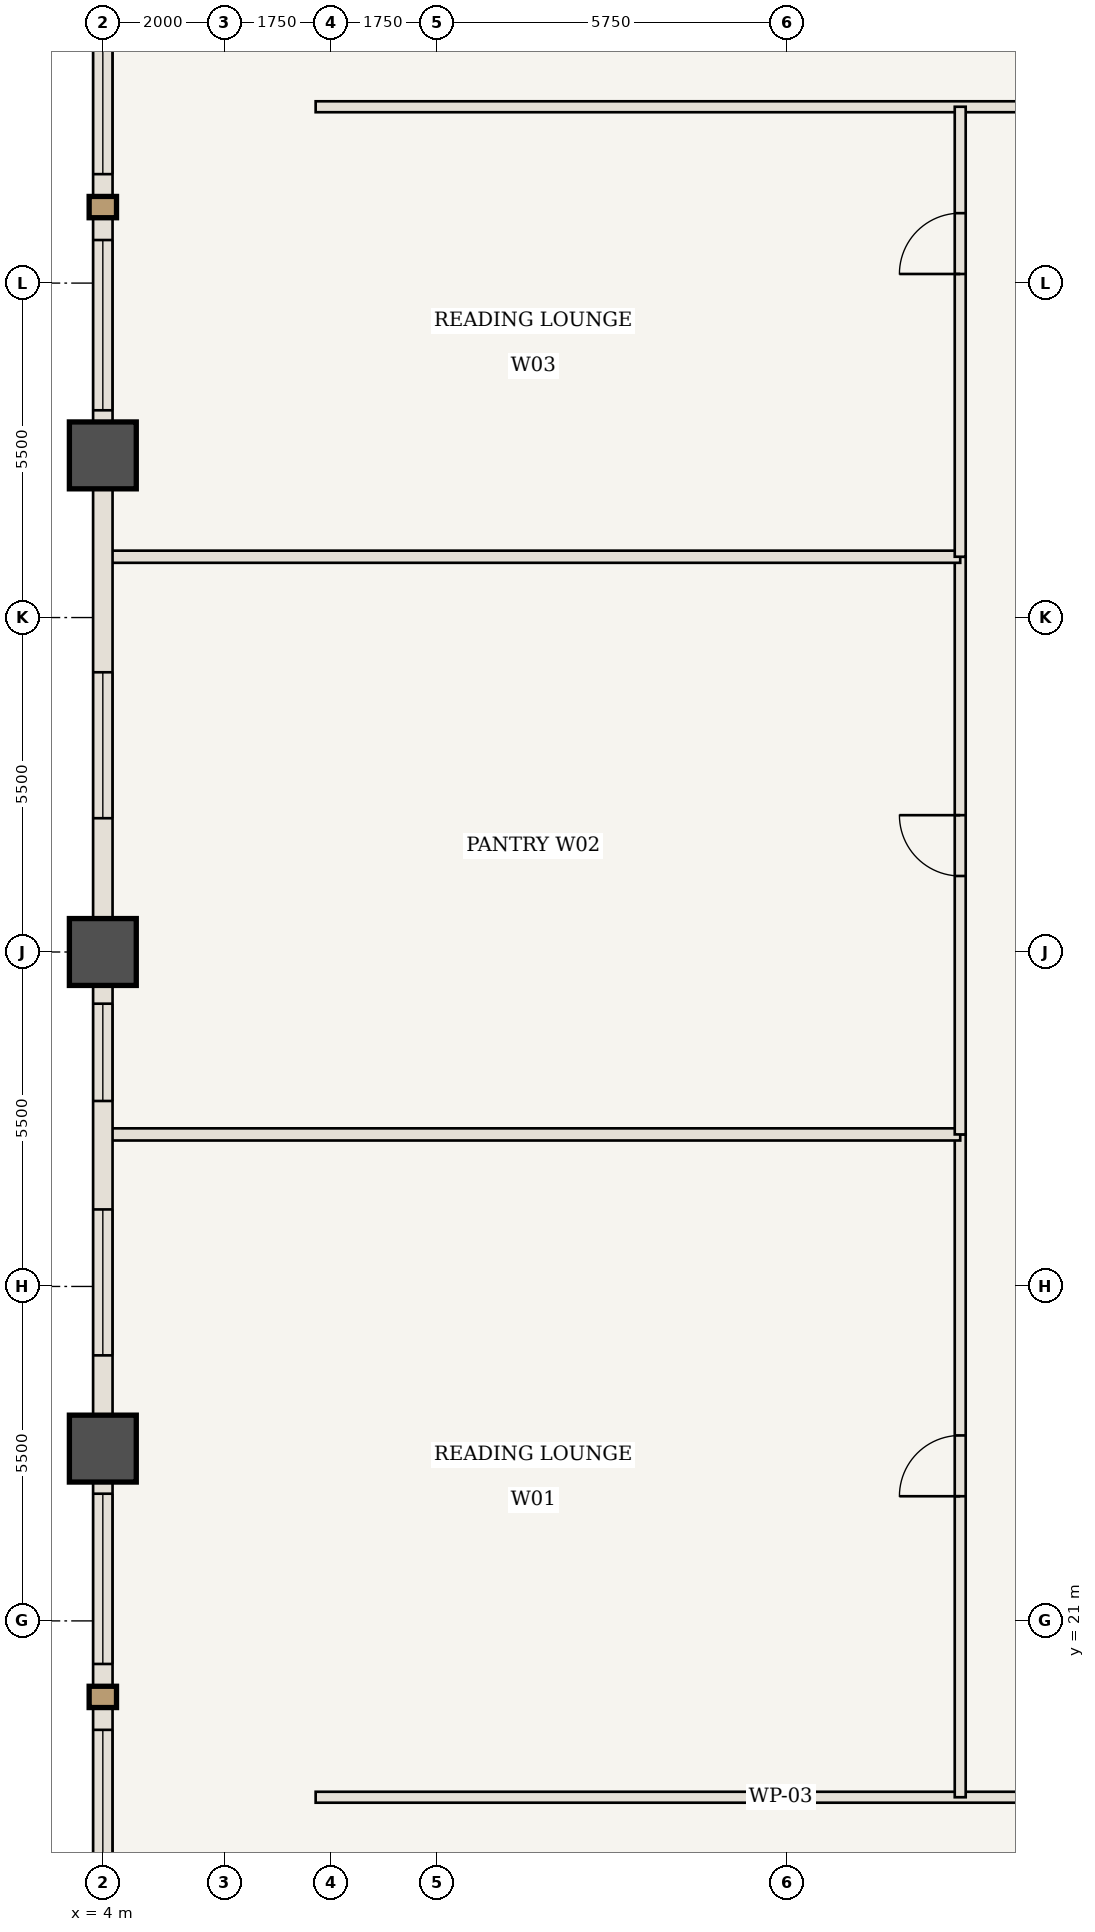
"""IFC4 building model, lengths in metres.
Left out: names, types, materials, properties, quantities, classifications, styles, units other than length and angle.
Written with IfcOpenShell. Run it as: python <this file> out.ifc"""

import sys

from ifc_helpers import new_model, si_unit, direction, frame, frame_2d, origin, origin_2d, place, context, subcontext, project, spatial, rectangle, extrude, element, fill, save


model = new_model("IFC4")
c1 = context("Model", 3, precision=1e-05, world=origin(), true_north=direction((0.0, 1.0)))
c2 = subcontext(c1, "Body", "Model", "MODEL_VIEW")
j1 = project(units=[si_unit("LENGTHUNIT", "METRE"), si_unit("PLANEANGLEUNIT", "RADIAN")], contexts=[c1])
p1 = place(None, origin())
s1 = spatial("IfcSite", under=j1, at=p1, CompositionType="ELEMENT")
p2 = place(p1, origin())
s2 = spatial("IfcBuilding", under=s1, at=p2, CompositionType="ELEMENT")
p3 = place(p2, frame((0.0, 0.0, 52.85)))
s3 = spatial("IfcBuildingStorey", under=s2, at=p3, CompositionType="ELEMENT", Elevation=52.85)
for number, where, z_axis, x_axis in (
    (1, (4.0, 23.833, 0.0), (0.0, 0.0, 1.0), (1.0, 0.0, 0.0)),
    (2, (4.0, 32.0, 0.0), (0.0, 0.0, 1.0), (1.0, 0.0, 0.0)),
    (3, (4.0, 40.167, 0.0), (0.0, 0.0, 1.0), (1.0, 0.0, 0.0)),
):
    element("IfcColumn", number, at=place(p3, frame(where, z_axis=z_axis, x_axis=x_axis)), inside=s3, PredefinedType="COLUMN", context=c2, shape_type="SweptSolid", body=[
        extrude(rectangle(XDim=1.1, YDim=1.1, at=origin_2d()), origin(), (0.0, 0.0, 1.0), 3.5),
    ])
p4 = place(p3, frame((7.5, 18.1, 0.0), z_axis=(0.0, 0.0, 1.0), x_axis=(1.0, 0.0, 0.0)))
e4 = element("IfcWall", 4, at=p4, inside=s3, PredefinedType="STANDARD", context=c2, shape_type="SweptSolid", body=[
    extrude(rectangle(XDim=15.3, YDim=0.18, at=frame_2d((7.65, 0.0))), origin(), (0.0, 0.0, 1.0), 3.32),
])
p5 = place(p4, frame((12.475, 0.0, 0.0)))
e5 = element("IfcOpeningElement", 5, at=p5, cuts=e4, PredefinedType="OPENING", context=c2, shape_type="SweptSolid", body=[
    extrude(rectangle(XDim=1.0, YDim=2.15, at=frame_2d((0.5, 1.075))), frame((0.0, 0.1, 0.0), z_axis=(0.0, -1.0, 0.0), x_axis=(1.0, 0.0, 0.0)), (0.0, 0.0, 1.0), 0.2),
])
p6 = place(p3, frame((7.5, 45.9, 0.0), z_axis=(0.0, 0.0, 1.0), x_axis=(1.0, 0.0, 0.0)))
e6 = element("IfcWall", 6, at=p6, inside=s3, PredefinedType="STANDARD", context=c2, shape_type="SweptSolid", body=[
    extrude(rectangle(XDim=16.4, YDim=0.18, at=frame_2d((8.2, 0.0))), origin(), (0.0, 0.0, 1.0), 3.32),
])
p7 = place(p6, frame((11.575, 0.0, 0.0)))
e7 = element("IfcOpeningElement", 7, at=p7, cuts=e6, PredefinedType="OPENING", context=c2, shape_type="SweptSolid", body=[
    extrude(rectangle(XDim=1.0, YDim=2.15, at=frame_2d((0.5, 1.075))), frame((0.0, 0.1, 0.0), z_axis=(0.0, -1.0, 0.0), x_axis=(1.0, 0.0, 0.0)), (0.0, 0.0, 1.0), 0.2),
])
p8 = place(p3, frame((18.1, 18.1, 0.0), z_axis=(0.0, 0.0, 1.0), x_axis=(0.0, 1.0, 0.0)))
e8 = element("IfcWall", 8, at=p8, inside=s3, PredefinedType="STANDARD", context=c2, shape_type="SweptSolid", body=[
    extrude(rectangle(XDim=10.9, YDim=0.18, at=frame_2d((5.45, 0.0))), origin(), (0.0, 0.0, 1.0), 3.32),
])
p9 = place(p8, frame((4.95, 0.0, 0.0)))
e9 = element("IfcOpeningElement", 9, at=p9, cuts=e8, PredefinedType="OPENING", context=c2, shape_type="SweptSolid", body=[
    extrude(rectangle(XDim=1.0, YDim=2.15, at=frame_2d((0.5, 1.075))), frame((0.0, 0.1, 0.0), z_axis=(0.0, -1.0, 0.0), x_axis=(1.0, 0.0, 0.0)), (0.0, 0.0, 1.0), 0.2),
])
p10 = place(p3, frame((4.06, 29.0, 0.0), z_axis=(0.0, 0.0, 1.0), x_axis=(1.0, 0.0, 0.0)))
e10 = element("IfcWall", 10, at=p10, inside=s3, PredefinedType="STANDARD", context=c2, shape_type="SweptSolid", body=[
    extrude(rectangle(XDim=14.04, YDim=0.2, at=frame_2d((7.02, 0.0))), origin(), (0.0, 0.0, 1.0), 3.32),
])
p11 = place(p3, frame((18.1, 29.0, 0.0), z_axis=(0.0, 0.0, 1.0), x_axis=(0.0, 1.0, 0.0)))
e11 = element("IfcWall", 11, at=p11, inside=s3, PredefinedType="STANDARD", context=c2, shape_type="SweptSolid", body=[
    extrude(rectangle(XDim=9.5, YDim=0.18, at=frame_2d((4.75, 0.0))), origin(), (0.0, 0.0, 1.0), 3.32),
])
p12 = place(p11, frame((4.25, 0.0, 0.0)))
e12 = element("IfcOpeningElement", 12, at=p12, cuts=e11, PredefinedType="OPENING", context=c2, shape_type="SweptSolid", body=[
    extrude(rectangle(XDim=1.0, YDim=2.15, at=frame_2d((0.5, 1.075))), frame((0.0, 0.1, 0.0), z_axis=(0.0, -1.0, 0.0), x_axis=(1.0, 0.0, 0.0)), (0.0, 0.0, 1.0), 0.2),
])
p13 = place(p3, frame((4.06, 38.5, 0.0), z_axis=(0.0, 0.0, 1.0), x_axis=(1.0, 0.0, 0.0)))
e13 = element("IfcWall", 13, at=p13, inside=s3, PredefinedType="STANDARD", context=c2, shape_type="SweptSolid", body=[
    extrude(rectangle(XDim=14.04, YDim=0.2, at=frame_2d((7.02, 0.0))), origin(), (0.0, 0.0, 1.0), 3.32),
])
p14 = place(p3, frame((18.1, 38.5, 0.0), z_axis=(0.0, 0.0, 1.0), x_axis=(0.0, 1.0, 0.0)))
e14 = element("IfcWall", 14, at=p14, inside=s3, PredefinedType="STANDARD", context=c2, shape_type="SweptSolid", body=[
    extrude(rectangle(XDim=7.4, YDim=0.18, at=frame_2d((3.7, 0.0))), origin(), (0.0, 0.0, 1.0), 3.32),
])
p15 = place(p14, frame((4.65, 0.0, 0.0)))
e15 = element("IfcOpeningElement", 15, at=p15, cuts=e14, PredefinedType="OPENING", context=c2, shape_type="SweptSolid", body=[
    extrude(rectangle(XDim=1.0, YDim=2.15, at=frame_2d((0.5, 1.075))), frame((0.0, 0.1, 0.0), z_axis=(0.0, -1.0, 0.0), x_axis=(1.0, 0.0, 0.0)), (0.0, 0.0, 1.0), 0.2),
])
p16 = place(p3, frame((4.0, 15.667, 0.0), z_axis=(0.0, 0.0, 1.0), x_axis=(0.0, 1.0, 0.0)))
e16 = element("IfcWall", 16, at=p16, inside=s3, PredefinedType="USERDEFINED", context=c2, shape_type="SweptSolid", body=[
    extrude(rectangle(XDim=8.167, YDim=0.32, at=frame_2d((4.083, 0.0))), origin(), (0.0, 0.0, 1.0), 2.52),
])
p17 = place(p16, frame((0.742, 0.0, 0.85)))
e17 = element("IfcOpeningElement", 17, at=p17, cuts=e16, PredefinedType="OPENING", context=c2, shape_type="SweptSolid", body=[
    extrude(rectangle(XDim=2.8, YDim=1.47, at=frame_2d((1.4, 0.735))), frame((0.0, 0.17, 0.0), z_axis=(0.0, -1.0, 0.0), x_axis=(1.0, 0.0, 0.0)), (0.0, 0.0, 1.0), 0.34),
])
p18 = place(p16, frame((4.625, 0.0, 0.85)))
e18 = element("IfcOpeningElement", 18, at=p18, cuts=e16, PredefinedType="OPENING", context=c2, shape_type="SweptSolid", body=[
    extrude(rectangle(XDim=2.8, YDim=1.47, at=frame_2d((1.4, 0.735))), frame((0.0, 0.17, 0.0), z_axis=(0.0, -1.0, 0.0), x_axis=(1.0, 0.0, 0.0)), (0.0, 0.0, 1.0), 0.34),
])
p19 = place(p3, frame((4.0, 23.833, 0.0), z_axis=(0.0, 0.0, 1.0), x_axis=(0.0, 1.0, 0.0)))
e19 = element("IfcWall", 19, at=p19, inside=s3, PredefinedType="USERDEFINED", context=c2, shape_type="SweptSolid", body=[
    extrude(rectangle(XDim=8.167, YDim=0.32, at=frame_2d((4.083, 0.0))), origin(), (0.0, 0.0, 1.0), 2.52),
])
p20 = place(p19, frame((1.533, 0.0, 0.85)))
e20 = element("IfcOpeningElement", 20, at=p20, cuts=e19, PredefinedType="OPENING", context=c2, shape_type="SweptSolid", body=[
    extrude(rectangle(XDim=2.4, YDim=1.47, at=frame_2d((1.2, 0.735))), frame((0.0, 0.17, 0.0), z_axis=(0.0, -1.0, 0.0), x_axis=(1.0, 0.0, 0.0)), (0.0, 0.0, 1.0), 0.34),
])
p21 = place(p19, frame((5.717, 0.0, 0.85)))
e21 = element("IfcOpeningElement", 21, at=p21, cuts=e19, PredefinedType="OPENING", context=c2, shape_type="SweptSolid", body=[
    extrude(rectangle(XDim=1.6, YDim=1.47, at=frame_2d((0.8, 0.735))), frame((0.0, 0.17, 0.0), z_axis=(0.0, -1.0, 0.0), x_axis=(1.0, 0.0, 0.0)), (0.0, 0.0, 1.0), 0.34),
])
p22 = place(p3, frame((4.0, 32.0, 0.0), z_axis=(0.0, 0.0, 1.0), x_axis=(0.0, 1.0, 0.0)))
e22 = element("IfcWall", 22, at=p22, inside=s3, PredefinedType="USERDEFINED", context=c2, shape_type="SweptSolid", body=[
    extrude(rectangle(XDim=8.167, YDim=0.32, at=frame_2d((4.083, 0.0))), origin(), (0.0, 0.0, 1.0), 2.52),
])
p23 = place(p22, frame((2.2, 0.0, 0.85)))
e23 = element("IfcOpeningElement", 23, at=p23, cuts=e22, PredefinedType="OPENING", context=c2, shape_type="SweptSolid", body=[
    extrude(rectangle(XDim=2.4, YDim=1.47, at=frame_2d((1.2, 0.735))), frame((0.0, 0.17, 0.0), z_axis=(0.0, -1.0, 0.0), x_axis=(1.0, 0.0, 0.0)), (0.0, 0.0, 1.0), 0.34),
])
p24 = place(p3, frame((4.0, 40.167, 0.0), z_axis=(0.0, 0.0, 1.0), x_axis=(0.0, 1.0, 0.0)))
e24 = element("IfcWall", 24, at=p24, inside=s3, PredefinedType="USERDEFINED", context=c2, shape_type="SweptSolid", body=[
    extrude(rectangle(XDim=8.167, YDim=0.32, at=frame_2d((4.083, 0.0))), origin(), (0.0, 0.0, 1.0), 2.52),
])
p25 = place(p24, frame((0.742, 0.0, 0.85)))
e25 = element("IfcOpeningElement", 25, at=p25, cuts=e24, PredefinedType="OPENING", context=c2, shape_type="SweptSolid", body=[
    extrude(rectangle(XDim=2.8, YDim=1.47, at=frame_2d((1.4, 0.735))), frame((0.0, 0.17, 0.0), z_axis=(0.0, -1.0, 0.0), x_axis=(1.0, 0.0, 0.0)), (0.0, 0.0, 1.0), 0.34),
])
p26 = place(p24, frame((4.625, 0.0, 0.85)))
e26 = element("IfcOpeningElement", 26, at=p26, cuts=e24, PredefinedType="OPENING", context=c2, shape_type="SweptSolid", body=[
    extrude(rectangle(XDim=2.8, YDim=1.47, at=frame_2d((1.4, 0.735))), frame((0.0, 0.17, 0.0), z_axis=(0.0, -1.0, 0.0), x_axis=(1.0, 0.0, 0.0)), (0.0, 0.0, 1.0), 0.34),
])
p27 = place(p9, origin())
e27 = element("IfcDoor", 27, at=p27, inside=s3, OperationType="SINGLE_SWING_LEFT", PredefinedType="DOOR", context=c2, shape_type="SweptSolid", body=[
    extrude(rectangle(XDim=1.0, YDim=2.15, at=frame_2d((0.5, 1.075))), frame((0.0, 0.025, 0.0), z_axis=(0.0, -1.0, 0.0), x_axis=(1.0, 0.0, 0.0)), (0.0, 0.0, 1.0), 0.05),
])
fill(e9, e27)
p28 = place(p12, origin())
e28 = element("IfcDoor", 28, at=p28, inside=s3, OperationType="SINGLE_SWING_RIGHT", PredefinedType="DOOR", context=c2, shape_type="SweptSolid", body=[
    extrude(rectangle(XDim=1.0, YDim=2.15, at=frame_2d((0.5, 1.075))), frame((0.0, 0.025, 0.0), z_axis=(0.0, -1.0, 0.0), x_axis=(1.0, 0.0, 0.0)), (0.0, 0.0, 1.0), 0.05),
])
fill(e12, e28)
p29 = place(p15, origin())
e29 = element("IfcDoor", 29, at=p29, inside=s3, OperationType="SINGLE_SWING_LEFT", PredefinedType="DOOR", context=c2, shape_type="SweptSolid", body=[
    extrude(rectangle(XDim=1.0, YDim=2.15, at=frame_2d((0.5, 1.075))), frame((0.0, 0.025, 0.0), z_axis=(0.0, -1.0, 0.0), x_axis=(1.0, 0.0, 0.0)), (0.0, 0.0, 1.0), 0.05),
])
fill(e15, e29)
p30 = place(p17, origin())
e30 = element("IfcWindow", 30, at=p30, inside=s3, PartitioningType="SINGLE_PANEL", PredefinedType="WINDOW", context=c2, shape_type="SweptSolid", body=[
    extrude(rectangle(XDim=2.8, YDim=1.47, at=frame_2d((1.4, 0.735))), frame((0.0, 0.03, 0.0), z_axis=(0.0, -1.0, 0.0), x_axis=(1.0, 0.0, 0.0)), (0.0, 0.0, 1.0), 0.06),
])
fill(e17, e30)
p31 = place(p18, origin())
e31 = element("IfcWindow", 31, at=p31, inside=s3, PartitioningType="SINGLE_PANEL", PredefinedType="WINDOW", context=c2, shape_type="SweptSolid", body=[
    extrude(rectangle(XDim=2.8, YDim=1.47, at=frame_2d((1.4, 0.735))), frame((0.0, 0.03, 0.0), z_axis=(0.0, -1.0, 0.0), x_axis=(1.0, 0.0, 0.0)), (0.0, 0.0, 1.0), 0.06),
])
fill(e18, e31)
p32 = place(p20, origin())
e32 = element("IfcWindow", 32, at=p32, inside=s3, PartitioningType="SINGLE_PANEL", PredefinedType="WINDOW", context=c2, shape_type="SweptSolid", body=[
    extrude(rectangle(XDim=2.4, YDim=1.47, at=frame_2d((1.2, 0.735))), frame((0.0, 0.03, 0.0), z_axis=(0.0, -1.0, 0.0), x_axis=(1.0, 0.0, 0.0)), (0.0, 0.0, 1.0), 0.06),
])
fill(e20, e32)
p33 = place(p21, origin())
e33 = element("IfcWindow", 33, at=p33, inside=s3, PartitioningType="SINGLE_PANEL", PredefinedType="WINDOW", context=c2, shape_type="SweptSolid", body=[
    extrude(rectangle(XDim=1.6, YDim=1.47, at=frame_2d((0.8, 0.735))), frame((0.0, 0.03, 0.0), z_axis=(0.0, -1.0, 0.0), x_axis=(1.0, 0.0, 0.0)), (0.0, 0.0, 1.0), 0.06),
])
fill(e21, e33)
p34 = place(p23, origin())
e34 = element("IfcWindow", 34, at=p34, inside=s3, PartitioningType="SINGLE_PANEL", PredefinedType="WINDOW", context=c2, shape_type="SweptSolid", body=[
    extrude(rectangle(XDim=2.4, YDim=1.47, at=frame_2d((1.2, 0.735))), frame((0.0, 0.03, 0.0), z_axis=(0.0, -1.0, 0.0), x_axis=(1.0, 0.0, 0.0)), (0.0, 0.0, 1.0), 0.06),
])
fill(e23, e34)
p35 = place(p25, origin())
e35 = element("IfcWindow", 35, at=p35, inside=s3, PartitioningType="SINGLE_PANEL", PredefinedType="WINDOW", context=c2, shape_type="SweptSolid", body=[
    extrude(rectangle(XDim=2.8, YDim=1.47, at=frame_2d((1.4, 0.735))), frame((0.0, 0.03, 0.0), z_axis=(0.0, -1.0, 0.0), x_axis=(1.0, 0.0, 0.0)), (0.0, 0.0, 1.0), 0.06),
])
fill(e25, e35)
p36 = place(p26, origin())
e36 = element("IfcWindow", 36, at=p36, inside=s3, PartitioningType="SINGLE_PANEL", PredefinedType="WINDOW", context=c2, shape_type="SweptSolid", body=[
    extrude(rectangle(XDim=2.8, YDim=1.47, at=frame_2d((1.4, 0.735))), frame((0.0, 0.03, 0.0), z_axis=(0.0, -1.0, 0.0), x_axis=(1.0, 0.0, 0.0)), (0.0, 0.0, 1.0), 0.06),
])
fill(e26, e36)
save(model, sys.argv[1])
